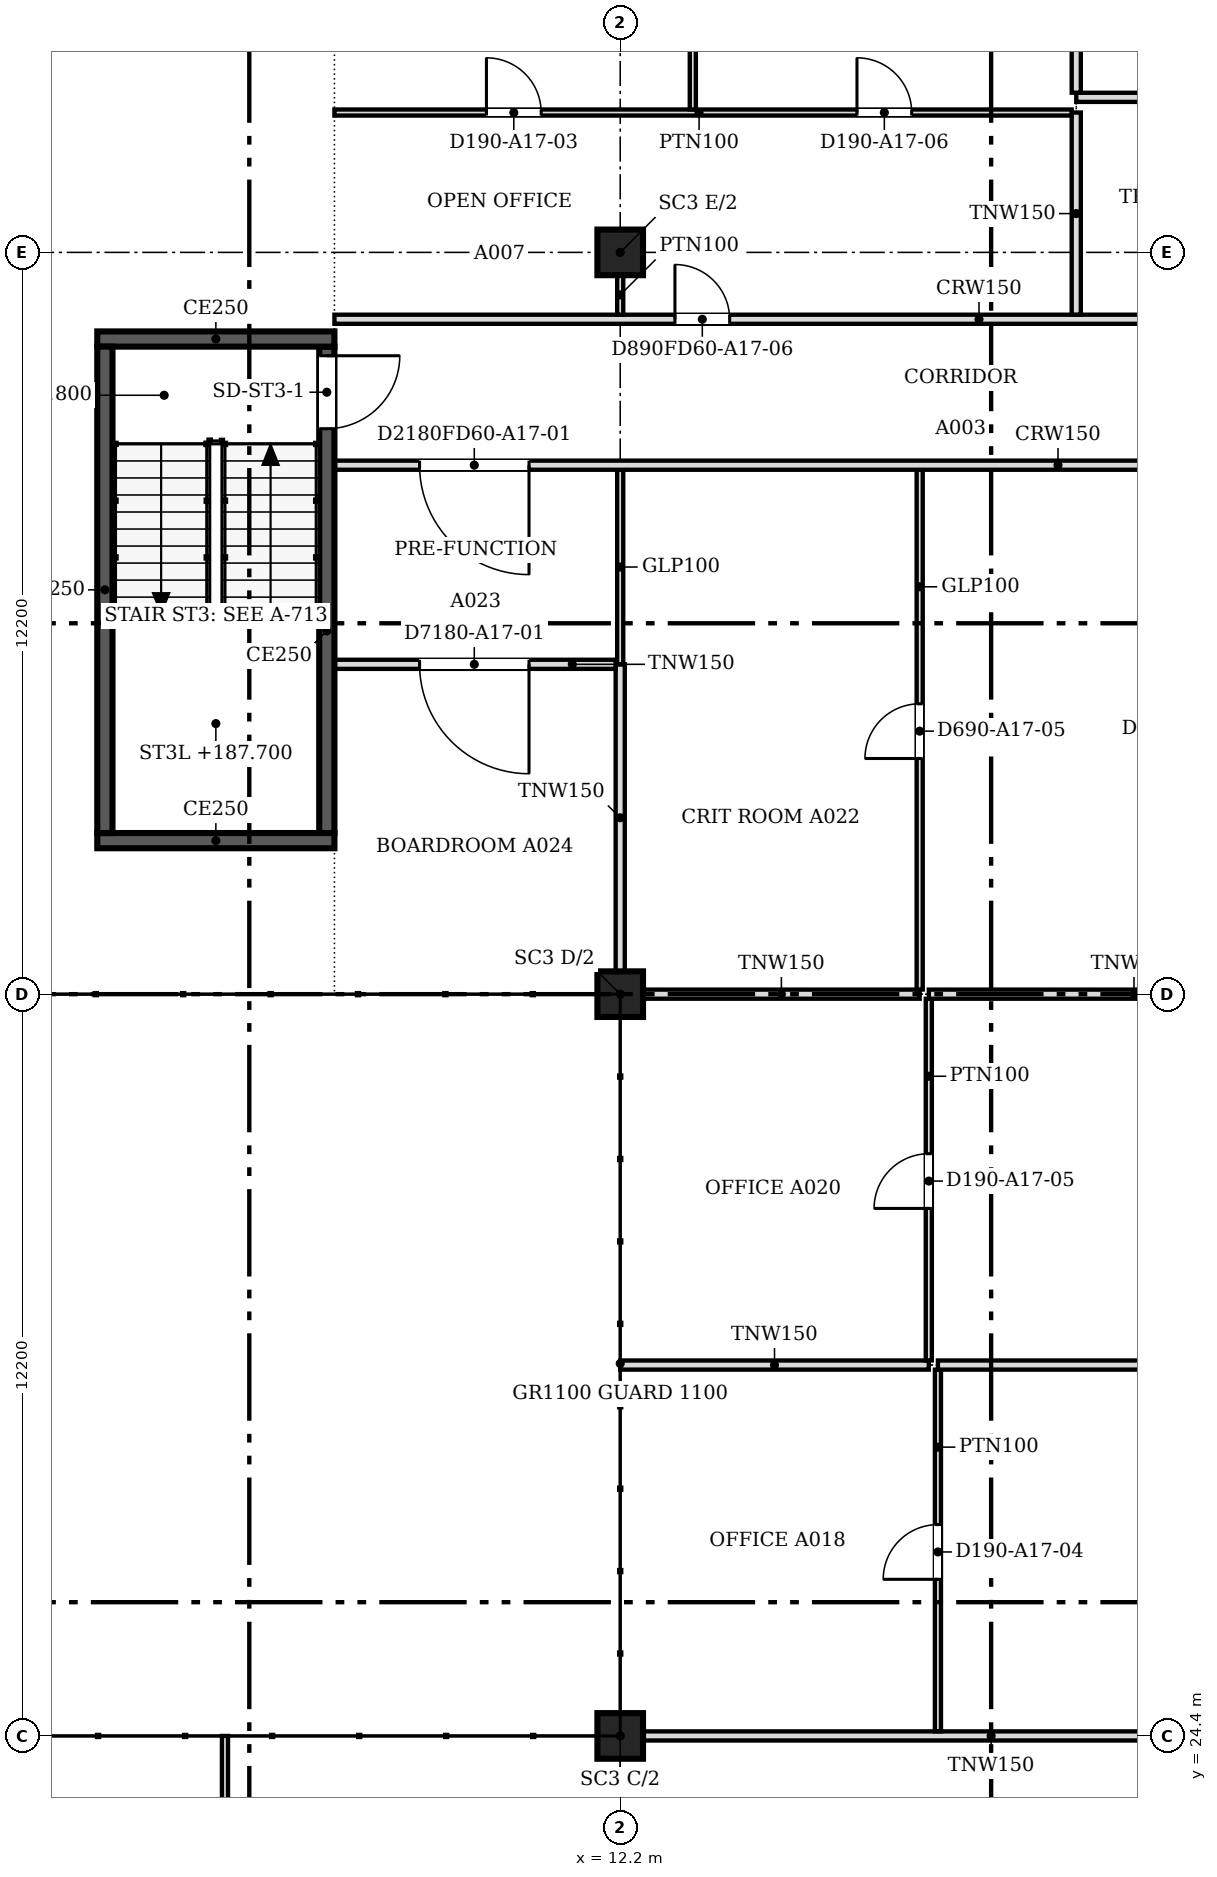
"""IFC4 building model, lengths in metres.
Left out: names, types, materials, properties, quantities, classifications, styles, units other than length and angle.
Written with IfcOpenShell. Run it as: python <this file> out.ifc"""

import sys

from ifc_helpers import new_model, si_unit, direction, frame, frame_2d, origin, origin_2d, place, context, subcontext, project, spatial, polyline, rectangle, outline, extrude, faceted_brep, source, transform, mapped, element, fill, save


model = new_model("IFC4")
c1 = context("Model", 3, precision=1e-05, world=origin(), true_north=direction((0.0, 1.0)))
c2 = subcontext(c1, "Body", "Model", "MODEL_VIEW")
j1 = project(units=[si_unit("LENGTHUNIT", "METRE"), si_unit("PLANEANGLEUNIT", "RADIAN")], contexts=[c1])
p1 = place(None, origin())
s1 = spatial("IfcSite", under=j1, at=p1, CompositionType="ELEMENT")
p2 = place(p1, origin())
s2 = spatial("IfcBuilding", under=s1, at=p2, CompositionType="ELEMENT")
p3 = place(p2, frame((0.0, 0.0, 185.8)))
s3 = spatial("IfcBuildingStorey", under=s2, at=p3, CompositionType="ELEMENT", Elevation=185.8)
for number, where, z_axis, x_axis in (
    (1, (12.2, 24.4, 0.0), (0.0, 0.0, 1.0), (1.0, 0.0, 0.0)),
    (2, (12.2, 36.6, 0.0), (0.0, 0.0, 1.0), (1.0, 0.0, 0.0)),
    (3, (12.2, 48.8, 0.0), (0.0, 0.0, 1.0), (1.0, 0.0, 0.0)),
):
    element("IfcColumn", number, at=place(p3, frame(where, z_axis=z_axis, x_axis=x_axis)), inside=s3, PredefinedType="COLUMN", context=c2, shape_type="SweptSolid", body=[
        extrude(rectangle(XDim=0.75, YDim=0.75, at=origin_2d()), origin(), (0.0, 0.0, 1.0), 3.6),
    ])
m1 = source(origin(), c2, "Body", "Brep", [
    faceted_brep([(2.944, -0.25, 0.0), (2.997, -0.25, 0.068), (2.997, -0.25, 7.532), (2.944, -0.25, 7.6), (0.0, -0.25, 3.8), (0.053, 0.25, 3.868), (2.891, 0.25, 7.532), (2.891, 0.25, 0.068), (0.053, 0.25, 3.732), (2.944, 0.0, 0.0), (2.944, 0.0, 7.6), (0.0, 0.0, 3.8)], [[[0, 1, 2, 3, 4]], [[5, 6, 7, 8]], [[1, 0, 9]], [[10, 3, 2]], [[6, 5, 11, 4, 3, 10]], [[8, 7, 9, 0, 4, 11]], [[8, 11, 5]], [[1, 9, 7, 6, 10, 2]]]),
])
p4 = place(p3, frame((3.394, 53.588, -3.8), z_axis=(0.0, 0.0, 1.0), x_axis=(-0.707106781187, -0.707106781187, 0.0)))
e4 = element("IfcWall", 4, at=p4, inside=s3, PredefinedType="SOLIDWALL", context=c2, shape_type="MappedRepresentation", body=[
    mapped(m1, transform((0.0, 0.0, 0.0), scale=1.0)),
])
m2 = source(origin(), c2, "Body", "SweptSolid", [
    extrude(outline(polyline([(2.744, 6.934), (0.316, 3.8), (2.744, 0.666), (2.744, 6.934)])), frame((0.0, 0.26, 0.0), z_axis=(0.0, -1.0, 0.0), x_axis=(1.0, 0.0, 0.0)), (0.0, 0.0, 1.0), 0.52),
])
p5 = place(p4, origin())
e5 = element("IfcOpeningElement", 5, at=p5, cuts=e4, PredefinedType="OPENING", context=c2, shape_type="MappedRepresentation", body=[
    mapped(m2, transform((0.0, 0.0, 0.0), scale=1.0)),
])
p6 = place(p2, frame((0.0, 0.0, 189.6)))
s4 = spatial("IfcBuildingStorey", under=s2, at=p6, CompositionType="ELEMENT", Elevation=189.6)
m3 = source(origin(), c2, "Body", "Brep", [
    faceted_brep([(0.053, -0.25, 0.0), (2.997, -0.25, 3.8), (0.053, -0.25, 7.6), (0.0, -0.25, 7.532), (0.0, -0.25, 0.068), (0.106, 0.25, 7.531), (2.944, 0.25, 3.868), (2.944, 0.25, 3.732), (0.106, 0.25, 0.068), (2.997, 0.0, 3.8), (0.053, 0.0, 0.0), (0.053, 0.0, 7.6)], [[[0, 1, 2, 3, 4]], [[5, 6, 7, 8]], [[8, 7, 9, 1, 0, 10]], [[6, 5, 11, 2, 1, 9]], [[3, 2, 11]], [[10, 0, 4]], [[8, 10, 4, 3, 11, 5]], [[7, 6, 9]]]),
])
p7 = place(p6, frame((3.431, 53.625, -3.8), z_axis=(0.0, 0.0, 1.0), x_axis=(-0.707106781187, -0.707106781187, 0.0)))
e6 = element("IfcWall", 6, at=p7, inside=s4, PredefinedType="SOLIDWALL", context=c2, shape_type="MappedRepresentation", body=[
    mapped(m3, transform((0.0, 0.0, 0.0), scale=1.0)),
])
m4 = source(origin(), c2, "Body", "SweptSolid", [
    extrude(outline(polyline([(0.253, 0.666), (2.681, 3.8), (0.253, 6.934), (0.253, 0.666)])), frame((0.0, 0.26, 0.0), z_axis=(0.0, -1.0, 0.0), x_axis=(1.0, 0.0, 0.0)), (0.0, 0.0, 1.0), 0.52),
])
p8 = place(p7, origin())
e7 = element("IfcOpeningElement", 7, at=p8, cuts=e6, PredefinedType="OPENING", context=c2, shape_type="MappedRepresentation", body=[
    mapped(m4, transform((0.0, 0.0, 0.0), scale=1.0)),
])
p9 = place(p3, frame((7.5, 39.125, 0.0), z_axis=(0.0, 0.0, 1.0), x_axis=(-1.0, 0.0, 0.0)))
e8 = element("IfcWall", 8, at=p9, inside=s3, PredefinedType="SOLIDWALL", context=c2, shape_type="SweptSolid", body=[
    extrude(rectangle(XDim=3.9, YDim=0.25, at=frame_2d((1.95, 0.0))), origin(), (0.0, 0.0, 1.0), 3.8),
])
p10 = place(p3, frame((3.725, 39.25, 0.0), z_axis=(0.0, 0.0, 1.0), x_axis=(0.0, 1.0, 0.0)))
e9 = element("IfcWall", 9, at=p10, inside=s3, PredefinedType="SOLIDWALL", context=c2, shape_type="SweptSolid", body=[
    extrude(rectangle(XDim=8.0, YDim=0.25, at=frame_2d((4.0, 0.0))), origin(), (0.0, 0.0, 1.0), 3.8),
])
p11 = place(p3, frame((3.6, 47.375, 0.0), z_axis=(0.0, 0.0, 1.0), x_axis=(1.0, 0.0, 0.0)))
e10 = element("IfcWall", 10, at=p11, inside=s3, PredefinedType="SOLIDWALL", context=c2, shape_type="SweptSolid", body=[
    extrude(rectangle(XDim=3.9, YDim=0.25, at=frame_2d((1.95, 0.0))), origin(), (0.0, 0.0, 1.0), 3.8),
])
p12 = place(p3, frame((7.375, 47.25, 0.0), z_axis=(0.0, 0.0, 1.0), x_axis=(0.0, -1.0, 0.0)))
e11 = element("IfcWall", 11, at=p12, inside=s3, PredefinedType="SOLIDWALL", context=c2, shape_type="SweptSolid", body=[
    extrude(rectangle(XDim=8.0, YDim=0.25, at=frame_2d((4.0, 0.0))), origin(), (0.0, 0.0, 1.0), 3.8),
])
m5 = source(origin(), c2, "Body", "SweptSolid", [
    extrude(rectangle(XDim=1.2, YDim=2.1, at=frame_2d((0.6, 1.05))), frame((0.0, 0.135, 0.0), z_axis=(0.0, -1.0, 0.0), x_axis=(1.0, 0.0, 0.0)), (0.0, 0.0, 1.0), 0.27),
])
p13 = place(p12, frame((0.15, 0.0, 0.0)))
e12 = element("IfcOpeningElement", 12, at=p13, cuts=e11, PredefinedType="OPENING", context=c2, shape_type="MappedRepresentation", body=[
    mapped(m5, transform((0.0, 0.0, 0.0), scale=1.0)),
])
p14 = place(p3, frame((5.7, 18.99, 0.0), z_axis=(0.0, 0.0, 1.0), x_axis=(0.0, 1.0, 0.0)))
e13 = element("IfcWall", 13, at=p14, inside=s3, PredefinedType="PARTITIONING", context=c2, shape_type="SweptSolid", body=[
    extrude(rectangle(XDim=5.41, YDim=0.1, at=frame_2d((2.705, 0.0))), origin(), (0.0, 0.0, 1.0), 3.067),
])
m6 = source(origin(), c2, "Body", "SweptSolid", [
    extrude(rectangle(XDim=0.9, YDim=2.1, at=frame_2d((0.45, 1.05))), frame((0.0, 0.06, 0.0), z_axis=(0.0, -1.0, 0.0), x_axis=(1.0, 0.0, 0.0)), (0.0, 0.0, 1.0), 0.12),
])
p15 = place(p14, frame((2.3, 0.0, 0.0)))
e14 = element("IfcOpeningElement", 14, at=p15, cuts=e13, PredefinedType="OPENING", context=c2, shape_type="MappedRepresentation", body=[
    mapped(m6, transform((0.0, 0.0, 0.0), scale=1.0)),
])
p16 = place(p3, frame((12.576, 24.4, 0.0), z_axis=(0.0, 0.0, 1.0), x_axis=(1.0, 0.0, 0.0)))
e15 = element("IfcWall", 15, at=p16, inside=s3, PredefinedType="PARTITIONING", context=c2, shape_type="SweptSolid", body=[
    extrude(rectangle(XDim=11.448, YDim=0.15, at=frame_2d((5.724, 0.0))), origin(), (0.0, 0.0, 1.0), 3.067),
])
p17 = place(p3, frame((17.425, 24.476, 0.0), z_axis=(0.0, 0.0, 1.0), x_axis=(0.0, 1.0, 0.0)))
e16 = element("IfcWall", 16, at=p17, inside=s3, PredefinedType="PARTITIONING", context=c2, shape_type="SweptSolid", body=[
    extrude(rectangle(XDim=5.948, YDim=0.1, at=frame_2d((2.974, 0.0))), origin(), (0.0, 0.0, 1.0), 3.067),
])
p18 = place(p17, frame((2.5, 0.0, 0.0)))
e17 = element("IfcOpeningElement", 17, at=p18, cuts=e16, PredefinedType="OPENING", context=c2, shape_type="MappedRepresentation", body=[
    mapped(m6, transform((0.0, 0.0, 0.0), scale=1.0)),
])
p19 = place(p3, frame((12.2, 30.5, 0.0), z_axis=(0.0, 0.0, 1.0), x_axis=(1.0, 0.0, 0.0)))
e18 = element("IfcWall", 18, at=p19, inside=s3, PredefinedType="PARTITIONING", context=c2, shape_type="SweptSolid", body=[
    extrude(rectangle(XDim=5.075, YDim=0.15, at=frame_2d((2.538, 0.0))), origin(), (0.0, 0.0, 1.0), 3.067),
])
p20 = place(p3, frame((17.425, 30.5, 0.0), z_axis=(0.0, 0.0, 1.0), x_axis=(1.0, 0.0, 0.0)))
e19 = element("IfcWall", 19, at=p20, inside=s3, PredefinedType="PARTITIONING", context=c2, shape_type="SweptSolid", body=[
    extrude(rectangle(XDim=10.599, YDim=0.15, at=frame_2d((5.299, 0.0))), origin(), (0.0, 0.0, 1.0), 3.067),
])
p21 = place(p3, frame((17.275, 30.576, 0.0), z_axis=(0.0, 0.0, 1.0), x_axis=(0.0, 1.0, 0.0)))
e20 = element("IfcWall", 20, at=p21, inside=s3, PredefinedType="PARTITIONING", context=c2, shape_type="SweptSolid", body=[
    extrude(rectangle(XDim=5.948, YDim=0.1, at=frame_2d((2.974, 0.0))), origin(), (0.0, 0.0, 1.0), 3.067),
])
p22 = place(p21, frame((2.5, 0.0, 0.0)))
e21 = element("IfcOpeningElement", 21, at=p22, cuts=e20, PredefinedType="OPENING", context=c2, shape_type="MappedRepresentation", body=[
    mapped(m6, transform((0.0, 0.0, 0.0), scale=1.0)),
])
p23 = place(p3, frame((12.576, 36.6, 0.0), z_axis=(0.0, 0.0, 1.0), x_axis=(1.0, 0.0, 0.0)))
e22 = element("IfcWall", 22, at=p23, inside=s3, PredefinedType="PARTITIONING", context=c2, shape_type="SweptSolid", body=[
    extrude(rectangle(XDim=4.549, YDim=0.15, at=frame_2d((2.274, 0.0))), origin(), (0.0, 0.0, 1.0), 3.067),
])
p24 = place(p3, frame((17.275, 36.6, 0.0), z_axis=(0.0, 0.0, 1.0), x_axis=(1.0, 0.0, 0.0)))
e23 = element("IfcWall", 23, at=p24, inside=s3, PredefinedType="PARTITIONING", context=c2, shape_type="SweptSolid", body=[
    extrude(rectangle(XDim=6.749, YDim=0.15, at=frame_2d((3.375, 0.0))), origin(), (0.0, 0.0, 1.0), 3.067),
])
p25 = place(p3, frame((17.125, 36.676, 0.0), z_axis=(0.0, 0.0, 1.0), x_axis=(0.0, 1.0, 0.0)))
e24 = element("IfcWall", 24, at=p25, inside=s3, PredefinedType="PARTITIONING", context=c2, shape_type="SweptSolid", body=[
    extrude(rectangle(XDim=8.548, YDim=0.1, at=frame_2d((4.274, 0.0))), origin(), (0.0, 0.0, 1.0), 3.067),
])
p26 = place(p25, frame((3.8, 0.0, 0.0)))
e25 = element("IfcOpeningElement", 25, at=p26, cuts=e24, PredefinedType="OPENING", context=c2, shape_type="MappedRepresentation", body=[
    mapped(m6, transform((0.0, 0.0, 0.0), scale=1.0)),
])
p27 = place(p3, frame((12.2, 36.976, 0.0), z_axis=(0.0, 0.0, 1.0), x_axis=(0.0, 1.0, 0.0)))
e26 = element("IfcWall", 26, at=p27, inside=s3, PredefinedType="PARTITIONING", context=c2, shape_type="SweptSolid", body=[
    extrude(rectangle(XDim=5.049, YDim=0.15, at=frame_2d((2.524, 0.0))), origin(), (0.0, 0.0, 1.0), 3.067),
])
p28 = place(p3, frame((12.124, 42.025, 0.0), z_axis=(0.0, 0.0, 1.0), x_axis=(-1.0, 0.0, 0.0)))
e27 = element("IfcWall", 27, at=p28, inside=s3, PredefinedType="PARTITIONING", context=c2, shape_type="SweptSolid", body=[
    extrude(rectangle(XDim=4.624, YDim=0.15, at=frame_2d((2.312, 0.0))), origin(), (0.0, 0.0, 1.0), 3.067),
])
m7 = source(origin(), c2, "Body", "SweptSolid", [
    extrude(rectangle(XDim=1.8, YDim=2.1, at=frame_2d((0.9, 1.05))), frame((0.0, 0.085, 0.0), z_axis=(0.0, -1.0, 0.0), x_axis=(1.0, 0.0, 0.0)), (0.0, 0.0, 1.0), 0.17),
])
p29 = place(p28, frame((1.424, 0.0, 0.0)))
e28 = element("IfcOpeningElement", 28, at=p29, cuts=e27, PredefinedType="OPENING", context=c2, shape_type="MappedRepresentation", body=[
    mapped(m7, transform((0.0, 0.0, 0.0), scale=1.0)),
])
p30 = place(p3, frame((12.2, 42.026, 0.0), z_axis=(0.0, 0.0, 1.0), x_axis=(0.0, 1.0, 0.0)))
e29 = element("IfcWall", 29, at=p30, inside=s3, PredefinedType="PARTITIONING", context=c2, shape_type="SweptSolid", body=[
    extrude(rectangle(XDim=3.198, YDim=0.1, at=frame_2d((1.599, 0.0))), origin(), (0.0, 0.0, 1.0), 3.067),
])
p31 = place(p3, frame((28.1, 45.3, 0.0), z_axis=(0.0, 0.0, 1.0), x_axis=(-1.0, 0.0, 0.0)))
e30 = element("IfcWall", 30, at=p31, inside=s3, PredefinedType="PARTITIONING", context=c2, shape_type="SweptSolid", body=[
    extrude(rectangle(XDim=20.6, YDim=0.15, at=frame_2d((10.3, 0.0))), origin(), (0.0, 0.0, 1.0), 3.067),
])
p32 = place(p31, frame((17.4, 0.0, 0.0)))
e31 = element("IfcOpeningElement", 31, at=p32, cuts=e30, PredefinedType="OPENING", context=c2, shape_type="MappedRepresentation", body=[
    mapped(m7, transform((0.0, 0.0, 0.0), scale=1.0)),
])
p33 = place(p3, frame((7.5, 47.7, 0.0), z_axis=(0.0, 0.0, 1.0), x_axis=(1.0, 0.0, 0.0)))
e32 = element("IfcWall", 32, at=p33, inside=s3, PredefinedType="PARTITIONING", context=c2, shape_type="SweptSolid", body=[
    extrude(rectangle(XDim=20.6, YDim=0.15, at=frame_2d((10.3, 0.0))), origin(), (0.0, 0.0, 1.0), 3.067),
])
p34 = place(p33, frame((14.701, 0.0, 0.0)))
e33 = element("IfcOpeningElement", 33, at=p34, cuts=e32, PredefinedType="OPENING", context=c2, shape_type="MappedRepresentation", body=[
    mapped(m7, transform((0.0, 0.0, 0.0), scale=1.0)),
])
m8 = source(origin(), c2, "Body", "SweptSolid", [
    extrude(rectangle(XDim=0.9, YDim=2.1, at=frame_2d((0.45, 1.05))), frame((0.0, 0.085, 0.0), z_axis=(0.0, -1.0, 0.0), x_axis=(1.0, 0.0, 0.0)), (0.0, 0.0, 1.0), 0.17),
])
p35 = place(p33, frame((5.6, 0.0, 0.0)))
e34 = element("IfcOpeningElement", 34, at=p35, cuts=e32, PredefinedType="OPENING", context=c2, shape_type="MappedRepresentation", body=[
    mapped(m8, transform((0.0, 0.0, 0.0), scale=1.0)),
])
p36 = place(p3, frame((19.7, 47.776, 0.0), z_axis=(0.0, 0.0, 1.0), x_axis=(0.0, 1.0, 0.0)))
e35 = element("IfcWall", 35, at=p36, inside=s3, PredefinedType="PARTITIONING", context=c2, shape_type="SweptSolid", body=[
    extrude(rectangle(XDim=3.324, YDim=0.15, at=frame_2d((1.662, 0.0))), origin(), (0.0, 0.0, 1.0), 3.067),
])
p37 = place(p3, frame((12.2, 48.425, 0.0), z_axis=(0.0, 0.0, 1.0), x_axis=(0.0, -1.0, 0.0)))
e36 = element("IfcWall", 36, at=p37, inside=s3, PredefinedType="PARTITIONING", context=c2, shape_type="SweptSolid", body=[
    extrude(rectangle(XDim=0.65, YDim=0.1, at=frame_2d((0.325, 0.0))), origin(), (0.0, 0.0, 1.0), 3.067),
])
p38 = place(p3, frame((7.5, 51.1, 0.0), z_axis=(0.0, 0.0, 1.0), x_axis=(1.0, 0.0, 0.0)))
e37 = element("IfcWall", 37, at=p38, inside=s3, PredefinedType="PARTITIONING", context=c2, shape_type="SweptSolid", body=[
    extrude(rectangle(XDim=12.124, YDim=0.1, at=frame_2d((6.062, 0.0))), origin(), (0.0, 0.0, 1.0), 3.067),
])
p39 = place(p38, frame((2.5, 0.0, 0.0)))
e38 = element("IfcOpeningElement", 38, at=p39, cuts=e37, PredefinedType="OPENING", context=c2, shape_type="MappedRepresentation", body=[
    mapped(m6, transform((0.0, 0.0, 0.0), scale=1.0)),
])
p40 = place(p38, frame((8.594, 0.0, 0.0)))
e39 = element("IfcOpeningElement", 39, at=p40, cuts=e37, PredefinedType="OPENING", context=c2, shape_type="MappedRepresentation", body=[
    mapped(m6, transform((0.0, 0.0, 0.0), scale=1.0)),
])
p41 = place(p3, frame((13.394, 51.151, 0.0), z_axis=(0.0, 0.0, 1.0), x_axis=(0.0, 1.0, 0.0)))
e40 = element("IfcWall", 40, at=p41, inside=s3, PredefinedType="PARTITIONING", context=c2, shape_type="SweptSolid", body=[
    extrude(rectangle(XDim=3.249, YDim=0.1, at=frame_2d((1.625, 0.0))), origin(), (0.0, 0.0, 1.0), 3.067),
])
p42 = place(p3, frame((19.7, 51.35, 0.0), z_axis=(0.0, 0.0, 1.0), x_axis=(1.0, 0.0, 0.0)))
e41 = element("IfcWall", 41, at=p42, inside=s3, PredefinedType="PARTITIONING", context=c2, shape_type="SweptSolid", body=[
    extrude(rectangle(XDim=8.4, YDim=0.15, at=frame_2d((4.2, 0.0))), origin(), (0.0, 0.0, 1.0), 3.067),
])
p43 = place(p42, frame((3.7, 0.0, 0.0)))
e42 = element("IfcOpeningElement", 42, at=p43, cuts=e41, PredefinedType="OPENING", context=c2, shape_type="MappedRepresentation", body=[
    mapped(m8, transform((0.0, 0.0, 0.0), scale=1.0)),
])
p44 = place(p3, frame((19.7, 51.426, 0.0), z_axis=(0.0, 0.0, 1.0), x_axis=(0.0, 1.0, 0.0)))
e43 = element("IfcWall", 43, at=p44, inside=s3, PredefinedType="PARTITIONING", context=c2, shape_type="SweptSolid", body=[
    extrude(rectangle(XDim=2.974, YDim=0.15, at=frame_2d((1.487, 0.0))), origin(), (0.0, 0.0, 1.0), 3.067),
])
m9 = source(origin(), c2, "Body", "SweptSolid", [
    extrude(rectangle(XDim=1.2, YDim=2.1, at=frame_2d((0.6, 1.05))), frame((0.0, 0.025, 0.0), z_axis=(0.0, -1.0, 0.0), x_axis=(1.0, 0.0, 0.0)), (0.0, 0.0, 1.0), 0.05),
])
p45 = place(p13, origin())
e44 = element("IfcDoor", 44, at=p45, inside=s3, OperationType="SINGLE_SWING_LEFT", PredefinedType="DOOR", context=c2, shape_type="MappedRepresentation", body=[
    mapped(m9, transform((0.0, 0.0, 0.0), scale=1.0)),
])
fill(e12, e44)
m10 = source(origin(), c2, "Body", "SweptSolid", [
    extrude(rectangle(XDim=1.8, YDim=2.1, at=frame_2d((0.9, 1.05))), frame((0.0, 0.025, 0.0), z_axis=(0.0, -1.0, 0.0), x_axis=(1.0, 0.0, 0.0)), (0.0, 0.0, 1.0), 0.05),
])
p46 = place(p29, origin())
e45 = element("IfcDoor", 45, at=p46, inside=s3, OperationType="DOUBLE_DOOR_SINGLE_SWING", PredefinedType="DOOR", context=c2, shape_type="MappedRepresentation", body=[
    mapped(m10, transform((0.0, 0.0, 0.0), scale=1.0)),
])
fill(e28, e45)
p47 = place(p32, origin())
e46 = element("IfcDoor", 46, at=p47, inside=s3, OperationType="DOUBLE_DOOR_SINGLE_SWING", PredefinedType="DOOR", context=c2, shape_type="MappedRepresentation", body=[
    mapped(m10, transform((0.0, 0.0, 0.0), scale=1.0)),
])
fill(e31, e46)
m11 = source(origin(), c2, "Body", "SweptSolid", [
    extrude(rectangle(XDim=0.9, YDim=2.1, at=frame_2d((0.45, 1.05))), frame((0.0, 0.025, 0.0), z_axis=(0.0, -1.0, 0.0), x_axis=(1.0, 0.0, 0.0)), (0.0, 0.0, 1.0), 0.05),
])
p48 = place(p39, origin())
e47 = element("IfcDoor", 47, at=p48, inside=s3, OperationType="SINGLE_SWING_LEFT", PredefinedType="DOOR", context=c2, shape_type="MappedRepresentation", body=[
    mapped(m11, transform((0.0, 0.0, 0.0), scale=1.0)),
])
fill(e38, e47)
p49 = place(p18, origin())
e48 = element("IfcDoor", 48, at=p49, inside=s3, OperationType="SINGLE_SWING_LEFT", PredefinedType="DOOR", context=c2, shape_type="MappedRepresentation", body=[
    mapped(m11, transform((0.0, 0.0, 0.0), scale=1.0)),
])
fill(e17, e48)
p50 = place(p22, origin())
e49 = element("IfcDoor", 49, at=p50, inside=s3, OperationType="SINGLE_SWING_LEFT", PredefinedType="DOOR", context=c2, shape_type="MappedRepresentation", body=[
    mapped(m11, transform((0.0, 0.0, 0.0), scale=1.0)),
])
fill(e21, e49)
p51 = place(p40, origin())
e50 = element("IfcDoor", 50, at=p51, inside=s3, OperationType="SINGLE_SWING_LEFT", PredefinedType="DOOR", context=c2, shape_type="MappedRepresentation", body=[
    mapped(m11, transform((0.0, 0.0, 0.0), scale=1.0)),
])
fill(e39, e50)
p52 = place(p26, origin())
e51 = element("IfcDoor", 51, at=p52, inside=s3, OperationType="SINGLE_SWING_LEFT", PredefinedType="DOOR", context=c2, shape_type="MappedRepresentation", body=[
    mapped(m11, transform((0.0, 0.0, 0.0), scale=1.0)),
])
fill(e25, e51)
p53 = place(p35, origin())
e52 = element("IfcDoor", 52, at=p53, inside=s3, OperationType="SINGLE_SWING_LEFT", PredefinedType="DOOR", context=c2, shape_type="MappedRepresentation", body=[
    mapped(m11, transform((0.0, 0.0, 0.0), scale=1.0)),
])
fill(e34, e52)
save(model, sys.argv[1])
